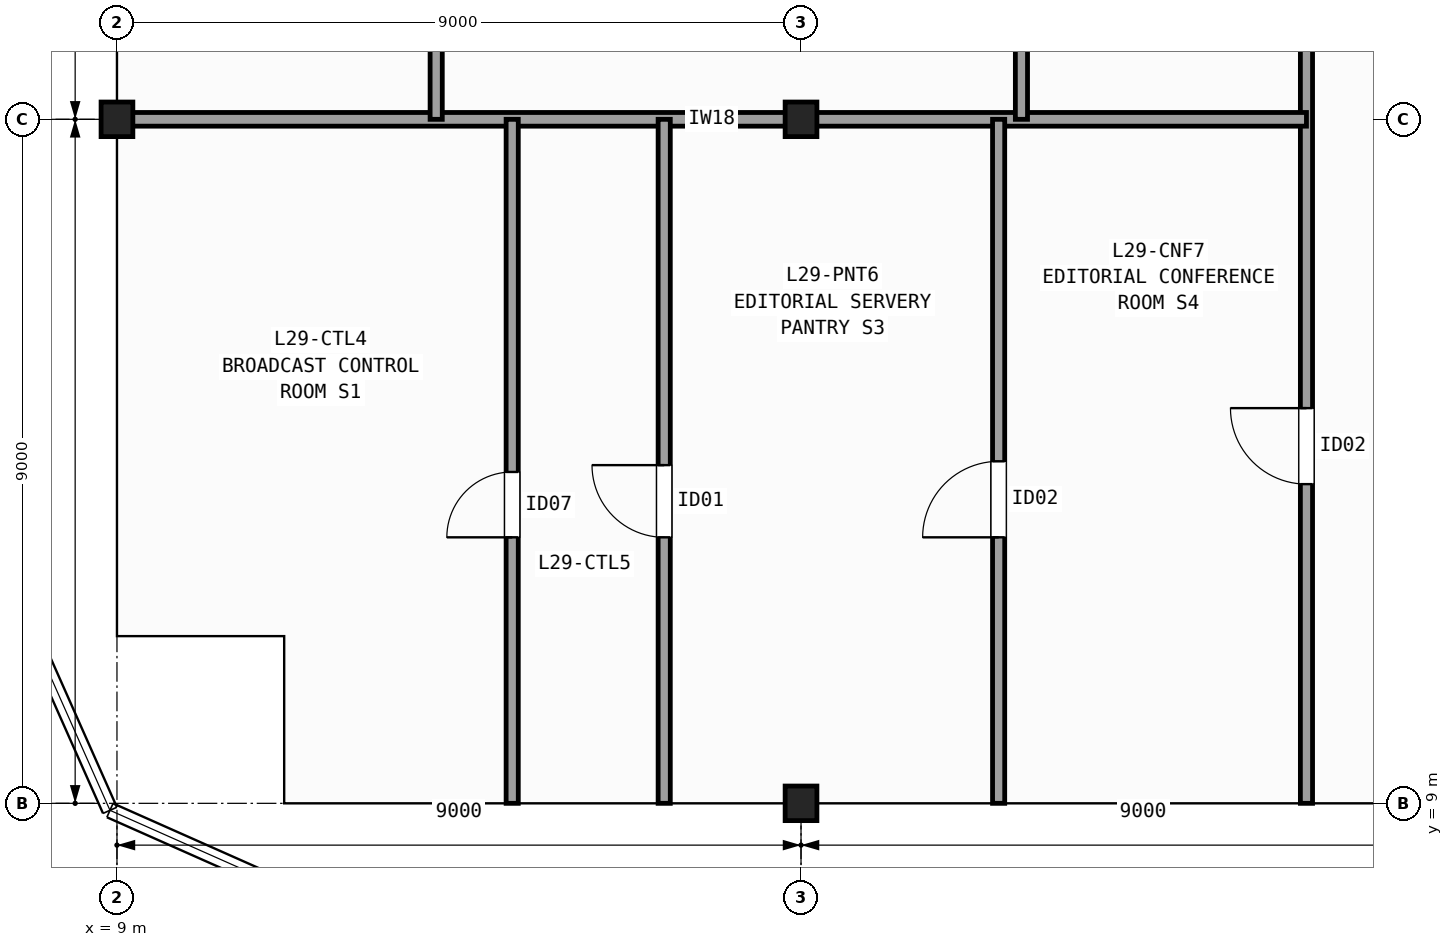
"""IFC4 building model, lengths in metres.
Left out: names, types, materials, properties, quantities, classifications, styles, units other than length and angle.
Written with IfcOpenShell. Run it as: python <this file> out.ifc"""

import sys

from ifc_helpers import new_model, si_unit, direction, frame, frame_2d, origin, origin_2d, place, context, subcontext, project, spatial, rectangle, i_section, extrude, element, fill, save


model = new_model("IFC4")
c1 = context("Model", 3, precision=1e-05, world=origin(), true_north=direction((0.0, 1.0)))
c2 = subcontext(c1, "Body", "Model", "MODEL_VIEW")
j1 = project(units=[si_unit("LENGTHUNIT", "METRE"), si_unit("PLANEANGLEUNIT", "RADIAN")], contexts=[c1])
p1 = place(None, origin())
s1 = spatial("IfcSite", under=j1, at=p1, CompositionType="ELEMENT")
p2 = place(p1, origin())
s2 = spatial("IfcBuilding", under=s1, at=p2, CompositionType="ELEMENT")
p3 = place(p2, frame((0.0, 0.0, 121.1)))
s3 = spatial("IfcBuildingStorey", under=s2, at=p3, CompositionType="ELEMENT", Elevation=121.1)
for number, where, z_axis, x_axis in (
    (1, (9.0, 18.0, 0.0), (0.0, 0.0, 1.0), (1.0, 0.0, 0.0)),
    (2, (18.0, 9.0, 0.0), (0.0, 0.0, 1.0), (1.0, 0.0, 0.0)),
    (3, (18.0, 18.0, 0.0), (0.0, 0.0, 1.0), (1.0, 0.0, 0.0)),
):
    element("IfcColumn", number, at=place(p3, frame(where, z_axis=z_axis, x_axis=x_axis)), inside=s3, PredefinedType="COLUMN", context=c2, shape_type="SweptSolid", body=[
        extrude(i_section(OverallWidth=0.418, OverallDepth=0.455, WebThickness=0.042, FlangeThickness=0.068, FilletRadius=0.015, at=origin_2d()), origin(), (0.0, 0.0, 1.0), 3.7),
    ])
p4 = place(p3, frame((24.65, 9.0, 0.0), z_axis=(0.0, 0.0, 1.0), x_axis=(0.0, 1.0, 0.0)))
e4 = element("IfcWall", 4, at=p4, inside=s3, PredefinedType="PARTITIONING", context=c2, shape_type="SweptSolid", body=[
    extrude(rectangle(XDim=19.2, YDim=0.16, at=frame_2d((9.6, 0.0))), origin(), (0.0, 0.0, 1.0), 2.634),
])
p5 = place(p4, frame((12.2, 0.0, 0.0)))
e5 = element("IfcOpeningElement", 5, at=p5, cuts=e4, PredefinedType="OPENING", context=c2, shape_type="SweptSolid", body=[
    extrude(rectangle(XDim=0.95, YDim=2.1, at=frame_2d((0.475, 1.05))), frame((0.0, 0.09, 0.0), z_axis=(0.0, -1.0, 0.0), x_axis=(1.0, 0.0, 0.0)), (0.0, 0.0, 1.0), 0.18),
])
p6 = place(p4, frame((4.2, 0.0, 0.0)))
e6 = element("IfcOpeningElement", 6, at=p6, cuts=e4, PredefinedType="OPENING", context=c2, shape_type="SweptSolid", body=[
    extrude(rectangle(XDim=1.0, YDim=2.1, at=frame_2d((0.5, 1.05))), frame((0.0, 0.09, 0.0), z_axis=(0.0, -1.0, 0.0), x_axis=(1.0, 0.0, 0.0)), (0.0, 0.0, 1.0), 0.18),
])
p7 = place(p3, frame((9.0, 18.0, 0.0), z_axis=(0.0, 0.0, 1.0), x_axis=(1.0, 0.0, 0.0)))
e7 = element("IfcWall", 7, at=p7, inside=s3, PredefinedType="PARTITIONING", context=c2, shape_type="SweptSolid", body=[
    extrude(rectangle(XDim=15.65, YDim=0.18, at=frame_2d((7.825, 0.0))), origin(), (0.0, 0.0, 1.0), 2.634),
])
p8 = place(p3, frame((13.2, 18.0, 0.0), z_axis=(0.0, 0.0, 1.0), x_axis=(0.0, 1.0, 0.0)))
e8 = element("IfcWall", 8, at=p8, inside=s3, PredefinedType="PARTITIONING", context=c2, shape_type="SweptSolid", body=[
    extrude(rectangle(XDim=10.13, YDim=0.16, at=frame_2d((5.065, 0.0))), origin(), (0.0, 0.0, 1.0), 2.789),
])
p9 = place(p8, frame((2.5, 0.0, 0.0)))
e9 = element("IfcOpeningElement", 9, at=p9, cuts=e8, PredefinedType="OPENING", context=c2, shape_type="SweptSolid", body=[
    extrude(rectangle(XDim=1.05, YDim=2.15, at=frame_2d((0.525, 1.075))), frame((0.0, 0.09, 0.0), z_axis=(0.0, -1.0, 0.0), x_axis=(1.0, 0.0, 0.0)), (0.0, 0.0, 1.0), 0.18),
])
p10 = place(p3, frame((20.9, 18.0, 0.0), z_axis=(0.0, 0.0, 1.0), x_axis=(0.0, 1.0, 0.0)))
e10 = element("IfcWall", 10, at=p10, inside=s3, PredefinedType="PARTITIONING", context=c2, shape_type="SweptSolid", body=[
    extrude(rectangle(XDim=10.13, YDim=0.16, at=frame_2d((5.065, 0.0))), origin(), (0.0, 0.0, 1.0), 2.789),
])
p11 = place(p10, frame((2.5, 0.0, 0.0)))
e11 = element("IfcOpeningElement", 11, at=p11, cuts=e10, PredefinedType="OPENING", context=c2, shape_type="SweptSolid", body=[
    extrude(rectangle(XDim=1.2, YDim=2.15, at=frame_2d((0.6, 1.075))), frame((0.0, 0.09, 0.0), z_axis=(0.0, -1.0, 0.0), x_axis=(1.0, 0.0, 0.0)), (0.0, 0.0, 1.0), 0.18),
])
p12 = place(p3, frame((14.2, 9.0, 0.0), z_axis=(0.0, 0.0, 1.0), x_axis=(0.0, 1.0, 0.0)))
e12 = element("IfcWall", 12, at=p12, inside=s3, PredefinedType="PARTITIONING", context=c2, shape_type="SweptSolid", body=[
    extrude(rectangle(XDim=9.0, YDim=0.16, at=frame_2d((4.5, 0.0))), origin(), (0.0, 0.0, 1.0), 2.789),
])
p13 = place(p12, frame((3.5, 0.0, 0.0)))
e13 = element("IfcOpeningElement", 13, at=p13, cuts=e12, PredefinedType="OPENING", context=c2, shape_type="SweptSolid", body=[
    extrude(rectangle(XDim=0.86, YDim=2.05, at=frame_2d((0.43, 1.025))), frame((0.0, 0.09, 0.0), z_axis=(0.0, -1.0, 0.0), x_axis=(1.0, 0.0, 0.0)), (0.0, 0.0, 1.0), 0.18),
])
p14 = place(p3, frame((16.2, 9.0, 0.0), z_axis=(0.0, 0.0, 1.0), x_axis=(0.0, 1.0, 0.0)))
e14 = element("IfcWall", 14, at=p14, inside=s3, PredefinedType="PARTITIONING", context=c2, shape_type="SweptSolid", body=[
    extrude(rectangle(XDim=9.0, YDim=0.16, at=frame_2d((4.5, 0.0))), origin(), (0.0, 0.0, 1.0), 2.789),
])
p15 = place(p14, frame((3.5, 0.0, 0.0)))
e15 = element("IfcOpeningElement", 15, at=p15, cuts=e14, PredefinedType="OPENING", context=c2, shape_type="SweptSolid", body=[
    extrude(rectangle(XDim=0.95, YDim=2.1, at=frame_2d((0.475, 1.05))), frame((0.0, 0.09, 0.0), z_axis=(0.0, -1.0, 0.0), x_axis=(1.0, 0.0, 0.0)), (0.0, 0.0, 1.0), 0.18),
])
p16 = place(p3, frame((20.6, 9.0, 0.0), z_axis=(0.0, 0.0, 1.0), x_axis=(0.0, 1.0, 0.0)))
e16 = element("IfcWall", 16, at=p16, inside=s3, PredefinedType="PARTITIONING", context=c2, shape_type="SweptSolid", body=[
    extrude(rectangle(XDim=9.0, YDim=0.16, at=frame_2d((4.5, 0.0))), origin(), (0.0, 0.0, 1.0), 2.634),
])
p17 = place(p16, frame((3.5, 0.0, 0.0)))
e17 = element("IfcOpeningElement", 17, at=p17, cuts=e16, PredefinedType="OPENING", context=c2, shape_type="SweptSolid", body=[
    extrude(rectangle(XDim=1.0, YDim=2.1, at=frame_2d((0.5, 1.05))), frame((0.0, 0.09, 0.0), z_axis=(0.0, -1.0, 0.0), x_axis=(1.0, 0.0, 0.0)), (0.0, 0.0, 1.0), 0.18),
])
p18 = place(p6, origin())
e18 = element("IfcDoor", 18, at=p18, inside=s3, OperationType="SINGLE_SWING_RIGHT", PredefinedType="DOOR", context=c2, shape_type="SweptSolid", body=[
    extrude(rectangle(XDim=1.0, YDim=2.1, at=frame_2d((0.5, 1.05))), frame((0.0, 0.025, 0.0), z_axis=(0.0, -1.0, 0.0), x_axis=(1.0, 0.0, 0.0)), (0.0, 0.0, 1.0), 0.05),
])
fill(e6, e18)
p19 = place(p13, origin())
e19 = element("IfcDoor", 19, at=p19, inside=s3, OperationType="SINGLE_SWING_LEFT", PredefinedType="DOOR", context=c2, shape_type="SweptSolid", body=[
    extrude(rectangle(XDim=0.86, YDim=2.05, at=frame_2d((0.43, 1.025))), frame((0.0, 0.025, 0.0), z_axis=(0.0, -1.0, 0.0), x_axis=(1.0, 0.0, 0.0)), (0.0, 0.0, 1.0), 0.05),
])
fill(e13, e19)
p20 = place(p15, origin())
e20 = element("IfcDoor", 20, at=p20, inside=s3, OperationType="SINGLE_SWING_RIGHT", PredefinedType="DOOR", context=c2, shape_type="SweptSolid", body=[
    extrude(rectangle(XDim=0.95, YDim=2.1, at=frame_2d((0.475, 1.05))), frame((0.0, 0.025, 0.0), z_axis=(0.0, -1.0, 0.0), x_axis=(1.0, 0.0, 0.0)), (0.0, 0.0, 1.0), 0.05),
])
fill(e15, e20)
p21 = place(p17, origin())
e21 = element("IfcDoor", 21, at=p21, inside=s3, OperationType="SINGLE_SWING_LEFT", PredefinedType="DOOR", context=c2, shape_type="SweptSolid", body=[
    extrude(rectangle(XDim=1.0, YDim=2.1, at=frame_2d((0.5, 1.05))), frame((0.0, 0.025, 0.0), z_axis=(0.0, -1.0, 0.0), x_axis=(1.0, 0.0, 0.0)), (0.0, 0.0, 1.0), 0.05),
])
fill(e17, e21)
save(model, sys.argv[1])
